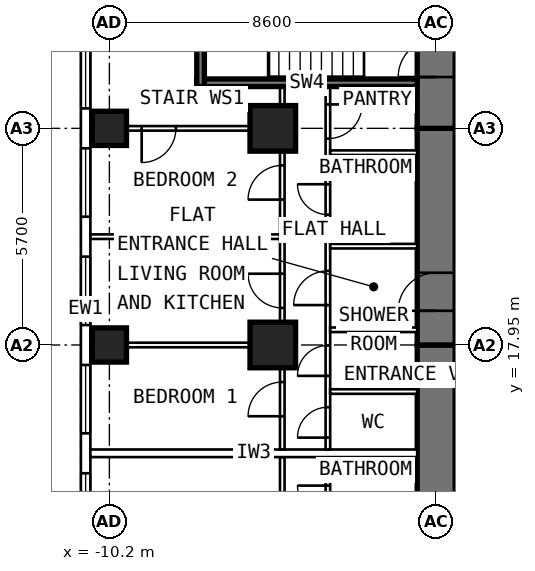
"""IFC4 building model, lengths in metres.
Left out: names, types, materials, properties, quantities, classifications, styles, units other than length and angle.
Written with IfcOpenShell. Run it as: python <this file> out.ifc"""

import sys

from ifc_helpers import new_model, si_unit, direction, frame, frame_2d, origin, origin_2d, place, context, subcontext, project, spatial, rectangle, extrude, element, fill, save


model = new_model("IFC4")
c1 = context("Model", 3, precision=1e-05, world=origin(), true_north=direction((0.0, 1.0)))
c2 = subcontext(c1, "Body", "Model", "MODEL_VIEW")
j1 = project(units=[si_unit("LENGTHUNIT", "METRE"), si_unit("PLANEANGLEUNIT", "RADIAN")], contexts=[c1])
p1 = place(None, origin())
s1 = spatial("IfcSite", under=j1, at=p1, CompositionType="ELEMENT")
p2 = place(p1, origin())
s2 = spatial("IfcBuilding", under=s1, at=p2, CompositionType="ELEMENT")
p3 = place(p2, frame((0.0, 0.0, 91.6)))
s3 = spatial("IfcBuildingStorey", under=s2, at=p3, CompositionType="ELEMENT", Elevation=91.6)
for number, where, z_axis, x_axis in (
    (1, (-10.2, 17.95, 0.0), (0.0, 0.0, 1.0), (0.0, 1.0, 0.0)),
    (2, (-10.2, 23.65, 0.0), (0.0, 0.0, 1.0), (0.0, 1.0, 0.0)),
):
    element("IfcColumn", number, at=place(p3, frame(where, z_axis=z_axis, x_axis=x_axis)), inside=s3, PredefinedType="COLUMN", context=c2, shape_type="SweptSolid", body=[
        extrude(rectangle(XDim=0.9, YDim=0.9, at=origin_2d()), origin(), (0.0, 0.0, 1.0), 3.6),
    ])
for number, where, z_axis, x_axis in (
    (3, (-5.9, 17.95, 0.0), (0.0, 0.0, 1.0), (0.0, 1.0, 0.0)),
    (4, (-5.9, 23.65, 0.0), (0.0, 0.0, 1.0), (0.0, 1.0, 0.0)),
):
    element("IfcColumn", number, at=place(p3, frame(where, z_axis=z_axis, x_axis=x_axis)), inside=s3, PredefinedType="COLUMN", context=c2, shape_type="SweptSolid", body=[
        extrude(rectangle(XDim=1.2, YDim=1.2, at=origin_2d()), origin(), (0.0, 0.0, 1.0), 3.6),
    ])
p4 = place(p3, frame((-1.6, 9.6, 0.0), z_axis=(0.0, 0.0, 1.0), x_axis=(0.0, 1.0, 0.0)))
e5 = element("IfcWall", 5, at=p4, inside=s3, PredefinedType="SHEAR", context=c2, shape_type="SweptSolid", body=[
    extrude(rectangle(XDim=8.35, YDim=1.0, at=frame_2d((4.175, 0.0))), origin(), (0.0, 0.0, 1.0), 3.6),
])
p5 = place(p4, frame((1.3, 0.0, 0.0)))
e6 = element("IfcOpeningElement", 6, at=p5, cuts=e5, PredefinedType="OPENING", context=c2, shape_type="SweptSolid", body=[
    extrude(rectangle(XDim=1.0, YDim=2.1, at=frame_2d((0.5, 1.05))), frame((0.0, 0.512, 0.0), z_axis=(0.0, -1.0, 0.0), x_axis=(1.0, 0.0, 0.0)), (0.0, 0.0, 1.0), 1.024),
])
p6 = place(p3, frame((-1.6, 17.95, 0.0), z_axis=(0.0, 0.0, 1.0), x_axis=(0.0, 1.0, 0.0)))
e7 = element("IfcWall", 7, at=p6, inside=s3, PredefinedType="SHEAR", context=c2, shape_type="SweptSolid", body=[
    extrude(rectangle(XDim=5.7, YDim=1.0, at=frame_2d((2.85, 0.0))), origin(), (0.0, 0.0, 1.0), 3.6),
])
p7 = place(p6, frame((0.9, 0.0, 0.0)))
e8 = element("IfcOpeningElement", 8, at=p7, cuts=e7, PredefinedType="OPENING", context=c2, shape_type="SweptSolid", body=[
    extrude(rectangle(XDim=1.0, YDim=2.1, at=frame_2d((0.5, 1.05))), frame((0.0, 0.512, 0.0), z_axis=(0.0, -1.0, 0.0), x_axis=(1.0, 0.0, 0.0)), (0.0, 0.0, 1.0), 1.024),
])
p8 = place(p3, frame((-1.6, 23.65, 0.0), z_axis=(0.0, 0.0, 1.0), x_axis=(0.0, 1.0, 0.0)))
e9 = element("IfcWall", 9, at=p8, inside=s3, PredefinedType="SHEAR", context=c2, shape_type="SweptSolid", body=[
    extrude(rectangle(XDim=10.745, YDim=1.0, at=frame_2d((5.373, 0.0))), origin(), (0.0, 0.0, 1.0), 3.6),
])
p9 = place(p8, frame((1.35, 0.0, 0.0)))
e10 = element("IfcOpeningElement", 10, at=p9, cuts=e9, PredefinedType="OPENING", context=c2, shape_type="SweptSolid", body=[
    extrude(rectangle(XDim=1.0, YDim=2.1, at=frame_2d((0.5, 1.05))), frame((0.0, 0.512, 0.0), z_axis=(0.0, -1.0, 0.0), x_axis=(1.0, 0.0, 0.0)), (0.0, 0.0, 1.0), 1.024),
])
p10 = place(p3, frame((-10.825, 6.148, 0.0), z_axis=(0.0, 0.0, 1.0), x_axis=(0.0, 1.0, 0.0)))
e11 = element("IfcWall", 11, at=p10, inside=s3, PredefinedType="SOLIDWALL", context=c2, shape_type="SweptSolid", body=[
    extrude(rectangle(XDim=25.487, YDim=0.25, at=frame_2d((12.744, 0.0))), origin(), (0.0, 0.0, 1.0), 3.35),
])
p11 = place(p10, frame((0.927, 0.0, 0.8)))
e12 = element("IfcOpeningElement", 12, at=p11, cuts=e11, PredefinedType="OPENING", context=c2, shape_type="SweptSolid", body=[
    extrude(rectangle(XDim=1.8, YDim=1.8, at=frame_2d((0.9, 0.9))), frame((0.0, 0.137, 0.0), z_axis=(0.0, -1.0, 0.0), x_axis=(1.0, 0.0, 0.0)), (0.0, 0.0, 1.0), 0.274),
])
p12 = place(p10, frame((3.777, 0.0, 0.8)))
e13 = element("IfcOpeningElement", 13, at=p12, cuts=e11, PredefinedType="OPENING", context=c2, shape_type="SweptSolid", body=[
    extrude(rectangle(XDim=1.8, YDim=1.8, at=frame_2d((0.9, 0.9))), frame((0.0, 0.137, 0.0), z_axis=(0.0, -1.0, 0.0), x_axis=(1.0, 0.0, 0.0)), (0.0, 0.0, 1.0), 0.274),
])
p13 = place(p10, frame((6.627, 0.0, 0.8)))
e14 = element("IfcOpeningElement", 14, at=p13, cuts=e11, PredefinedType="OPENING", context=c2, shape_type="SweptSolid", body=[
    extrude(rectangle(XDim=1.8, YDim=1.8, at=frame_2d((0.9, 0.9))), frame((0.0, 0.137, 0.0), z_axis=(0.0, -1.0, 0.0), x_axis=(1.0, 0.0, 0.0)), (0.0, 0.0, 1.0), 0.274),
])
p14 = place(p10, frame((9.477, 0.0, 0.8)))
e15 = element("IfcOpeningElement", 15, at=p14, cuts=e11, PredefinedType="OPENING", context=c2, shape_type="SweptSolid", body=[
    extrude(rectangle(XDim=1.8, YDim=1.8, at=frame_2d((0.9, 0.9))), frame((0.0, 0.137, 0.0), z_axis=(0.0, -1.0, 0.0), x_axis=(1.0, 0.0, 0.0)), (0.0, 0.0, 1.0), 0.274),
])
p15 = place(p10, frame((12.327, 0.0, 0.8)))
e16 = element("IfcOpeningElement", 16, at=p15, cuts=e11, PredefinedType="OPENING", context=c2, shape_type="SweptSolid", body=[
    extrude(rectangle(XDim=1.8, YDim=1.8, at=frame_2d((0.9, 0.9))), frame((0.0, 0.137, 0.0), z_axis=(0.0, -1.0, 0.0), x_axis=(1.0, 0.0, 0.0)), (0.0, 0.0, 1.0), 0.274),
])
p16 = place(p10, frame((15.177, 0.0, 0.8)))
e17 = element("IfcOpeningElement", 17, at=p16, cuts=e11, PredefinedType="OPENING", context=c2, shape_type="SweptSolid", body=[
    extrude(rectangle(XDim=1.8, YDim=1.8, at=frame_2d((0.9, 0.9))), frame((0.0, 0.137, 0.0), z_axis=(0.0, -1.0, 0.0), x_axis=(1.0, 0.0, 0.0)), (0.0, 0.0, 1.0), 0.274),
])
p17 = place(p10, frame((18.027, 0.0, 0.8)))
e18 = element("IfcOpeningElement", 18, at=p17, cuts=e11, PredefinedType="OPENING", context=c2, shape_type="SweptSolid", body=[
    extrude(rectangle(XDim=1.8, YDim=1.8, at=frame_2d((0.9, 0.9))), frame((0.0, 0.137, 0.0), z_axis=(0.0, -1.0, 0.0), x_axis=(1.0, 0.0, 0.0)), (0.0, 0.0, 1.0), 0.274),
])
p18 = place(p10, frame((20.877, 0.0, 0.8)))
e19 = element("IfcOpeningElement", 19, at=p18, cuts=e11, PredefinedType="OPENING", context=c2, shape_type="SweptSolid", body=[
    extrude(rectangle(XDim=1.8, YDim=1.8, at=frame_2d((0.9, 0.9))), frame((0.0, 0.137, 0.0), z_axis=(0.0, -1.0, 0.0), x_axis=(1.0, 0.0, 0.0)), (0.0, 0.0, 1.0), 0.274),
])
p19 = place(p3, frame((-4.45, 10.1, 0.0), z_axis=(0.0, 0.0, 1.0), x_axis=(0.0, 1.0, 0.0)))
e20 = element("IfcWall", 20, at=p19, inside=s3, PredefinedType="PARTITIONING", context=c2, shape_type="SweptSolid", body=[
    extrude(rectangle(XDim=4.9, YDim=0.12, at=frame_2d((2.45, 0.0))), origin(), (0.0, 0.0, 1.0), 3.35),
])
p20 = place(p19, frame((0.75, 0.0, 0.0)))
e21 = element("IfcOpeningElement", 21, at=p20, cuts=e20, PredefinedType="OPENING", context=c2, shape_type="SweptSolid", body=[
    extrude(rectangle(XDim=0.9, YDim=2.1, at=frame_2d((0.45, 1.05))), frame((0.0, 0.072, 0.0), z_axis=(0.0, -1.0, 0.0), x_axis=(1.0, 0.0, 0.0)), (0.0, 0.0, 1.0), 0.144),
])
p21 = place(p19, frame((3.35, 0.0, 0.0)))
e22 = element("IfcOpeningElement", 22, at=p21, cuts=e20, PredefinedType="OPENING", context=c2, shape_type="SweptSolid", body=[
    extrude(rectangle(XDim=0.8, YDim=2.1, at=frame_2d((0.4, 1.05))), frame((0.0, 0.072, 0.0), z_axis=(0.0, -1.0, 0.0), x_axis=(1.0, 0.0, 0.0)), (0.0, 0.0, 1.0), 0.144),
])
p22 = place(p3, frame((-5.65, 9.6, 0.0), z_axis=(0.0, 0.0, 1.0), x_axis=(0.0, 1.0, 0.0)))
e23 = element("IfcWall", 23, at=p22, inside=s3, PredefinedType="PARTITIONING", context=c2, shape_type="SweptSolid", body=[
    extrude(rectangle(XDim=5.4, YDim=0.12, at=frame_2d((2.7, 0.0))), origin(), (0.0, 0.0, 1.0), 3.35),
])
p23 = place(p22, frame((3.4, 0.0, 0.0)))
e24 = element("IfcOpeningElement", 24, at=p23, cuts=e23, PredefinedType="OPENING", context=c2, shape_type="SweptSolid", body=[
    extrude(rectangle(XDim=0.9, YDim=2.1, at=frame_2d((0.45, 1.05))), frame((0.0, 0.072, 0.0), z_axis=(0.0, -1.0, 0.0), x_axis=(1.0, 0.0, 0.0)), (0.0, 0.0, 1.0), 0.144),
])
p24 = place(p3, frame((-4.45, 15.2, 0.0), z_axis=(0.0, 0.0, 1.0), x_axis=(0.0, 1.0, 0.0)))
e25 = element("IfcWall", 25, at=p24, inside=s3, PredefinedType="PARTITIONING", context=c2, shape_type="SweptSolid", body=[
    extrude(rectangle(XDim=9.55, YDim=0.12, at=frame_2d((4.775, 0.0))), origin(), (0.0, 0.0, 1.0), 3.35),
])
p25 = place(p24, frame((0.312, 0.0, 0.0)))
e26 = element("IfcOpeningElement", 26, at=p25, cuts=e25, PredefinedType="OPENING", context=c2, shape_type="SweptSolid", body=[
    extrude(rectangle(XDim=0.8, YDim=2.1, at=frame_2d((0.4, 1.05))), frame((0.0, 0.072, 0.0), z_axis=(0.0, -1.0, 0.0), x_axis=(1.0, 0.0, 0.0)), (0.0, 0.0, 1.0), 0.144),
])
p26 = place(p24, frame((1.938, 0.0, 0.0)))
e27 = element("IfcOpeningElement", 27, at=p26, cuts=e25, PredefinedType="OPENING", context=c2, shape_type="SweptSolid", body=[
    extrude(rectangle(XDim=0.8, YDim=2.1, at=frame_2d((0.4, 1.05))), frame((0.0, 0.072, 0.0), z_axis=(0.0, -1.0, 0.0), x_axis=(1.0, 0.0, 0.0)), (0.0, 0.0, 1.0), 0.144),
])
p27 = place(p24, frame((3.8, 0.0, 0.0)))
e28 = element("IfcOpeningElement", 28, at=p27, cuts=e25, PredefinedType="OPENING", context=c2, shape_type="SweptSolid", body=[
    extrude(rectangle(XDim=0.9, YDim=2.1, at=frame_2d((0.45, 1.05))), frame((0.0, 0.072, 0.0), z_axis=(0.0, -1.0, 0.0), x_axis=(1.0, 0.0, 0.0)), (0.0, 0.0, 1.0), 0.144),
])
p28 = place(p24, frame((6.18, 0.0, 0.0)))
e29 = element("IfcOpeningElement", 29, at=p28, cuts=e25, PredefinedType="OPENING", context=c2, shape_type="SweptSolid", body=[
    extrude(rectangle(XDim=0.8, YDim=2.1, at=frame_2d((0.4, 1.05))), frame((0.0, 0.072, 0.0), z_axis=(0.0, -1.0, 0.0), x_axis=(1.0, 0.0, 0.0)), (0.0, 0.0, 1.0), 0.144),
])
p29 = place(p24, frame((8.18, 0.0, 0.0)))
e30 = element("IfcOpeningElement", 30, at=p29, cuts=e25, PredefinedType="OPENING", context=c2, shape_type="SweptSolid", body=[
    extrude(rectangle(XDim=0.9, YDim=2.1, at=frame_2d((0.45, 1.05))), frame((0.0, 0.072, 0.0), z_axis=(0.0, -1.0, 0.0), x_axis=(1.0, 0.0, 0.0)), (0.0, 0.0, 1.0), 0.144),
])
p30 = place(p3, frame((-5.65, 15.2, 0.0), z_axis=(0.0, 0.0, 1.0), x_axis=(0.0, 1.0, 0.0)))
e31 = element("IfcWall", 31, at=p30, inside=s3, PredefinedType="PARTITIONING", context=c2, shape_type="SweptSolid", body=[
    extrude(rectangle(XDim=9.55, YDim=0.12, at=frame_2d((4.775, 0.0))), origin(), (0.0, 0.0, 1.0), 3.35),
])
p31 = place(p30, frame((0.875, 0.0, 0.0)))
e32 = element("IfcOpeningElement", 32, at=p31, cuts=e31, PredefinedType="OPENING", context=c2, shape_type="SweptSolid", body=[
    extrude(rectangle(XDim=0.9, YDim=2.1, at=frame_2d((0.45, 1.05))), frame((0.0, 0.072, 0.0), z_axis=(0.0, -1.0, 0.0), x_axis=(1.0, 0.0, 0.0)), (0.0, 0.0, 1.0), 0.144),
])
p32 = place(p30, frame((3.725, 0.0, 0.0)))
e33 = element("IfcOpeningElement", 33, at=p32, cuts=e31, PredefinedType="OPENING", context=c2, shape_type="SweptSolid", body=[
    extrude(rectangle(XDim=0.9, YDim=2.1, at=frame_2d((0.45, 1.05))), frame((0.0, 0.072, 0.0), z_axis=(0.0, -1.0, 0.0), x_axis=(1.0, 0.0, 0.0)), (0.0, 0.0, 1.0), 0.144),
])
p33 = place(p30, frame((6.575, 0.0, 0.0)))
e34 = element("IfcOpeningElement", 34, at=p33, cuts=e31, PredefinedType="OPENING", context=c2, shape_type="SweptSolid", body=[
    extrude(rectangle(XDim=0.9, YDim=2.1, at=frame_2d((0.45, 1.05))), frame((0.0, 0.072, 0.0), z_axis=(0.0, -1.0, 0.0), x_axis=(1.0, 0.0, 0.0)), (0.0, 0.0, 1.0), 0.144),
])
p34 = place(p3, frame((-5.71, 17.95, 0.0), z_axis=(0.0, 0.0, 1.0), x_axis=(-1.0, 0.0, 0.0)))
e35 = element("IfcWall", 35, at=p34, inside=s3, PredefinedType="PARTITIONING", context=c2, shape_type="SweptSolid", body=[
    extrude(rectangle(XDim=4.99, YDim=0.12, at=frame_2d((2.495, 0.0))), origin(), (0.0, 0.0, 1.0), 2.45),
])
p35 = place(p3, frame((-5.71, 20.8, 0.0), z_axis=(0.0, 0.0, 1.0), x_axis=(-1.0, 0.0, 0.0)))
e36 = element("IfcWall", 36, at=p35, inside=s3, PredefinedType="PARTITIONING", context=c2, shape_type="SweptSolid", body=[
    extrude(rectangle(XDim=4.99, YDim=0.12, at=frame_2d((2.495, 0.0))), origin(), (0.0, 0.0, 1.0), 3.35),
])
for number, where, z_axis, x_axis in (
    (37, (-2.1, 16.725, 0.0), (0.0, 0.0, 1.0), (-1.0, 0.0, 0.0)),
    (38, (-2.1, 18.35, 0.0), (0.0, 0.0, 1.0), (-1.0, 0.0, 0.0)),
    (39, (-2.1, 20.55, 0.0), (0.0, 0.0, 1.0), (-1.0, 0.0, 0.0)),
    (40, (-2.1, 23.01, 0.0), (0.0, 0.0, 1.0), (-1.0, 0.0, 0.0)),
):
    element("IfcWall", number, at=place(p3, frame(where, z_axis=z_axis, x_axis=x_axis)), inside=s3, PredefinedType="PARTITIONING", context=c2, shape_type="SweptSolid", body=[
        extrude(rectangle(XDim=2.29, YDim=0.12, at=frame_2d((1.145, 0.0))), origin(), (0.0, 0.0, 1.0), 3.35),
    ])
p36 = place(p3, frame((-2.1, 15.1, 0.0), z_axis=(0.0, 0.0, 1.0), x_axis=(-1.0, 0.0, 0.0)))
e41 = element("IfcWall", 41, at=p36, inside=s3, PredefinedType="PARTITIONING", context=c2, shape_type="SweptSolid", body=[
    extrude(rectangle(XDim=8.6, YDim=0.2, at=frame_2d((4.3, 0.0))), origin(), (0.0, 0.0, 1.0), 3.35),
])
p37 = place(p3, frame((-5.71, 23.65, 0.0), z_axis=(0.0, 0.0, 1.0), x_axis=(-1.0, 0.0, 0.0)))
e42 = element("IfcWall", 42, at=p37, inside=s3, PredefinedType="PARTITIONING", context=c2, shape_type="SweptSolid", body=[
    extrude(rectangle(XDim=4.99, YDim=0.12, at=frame_2d((2.495, 0.0))), origin(), (0.0, 0.0, 1.0), 2.45),
])
p38 = place(p37, frame((2.74, 0.0, 0.0)))
e43 = element("IfcOpeningElement", 43, at=p38, cuts=e42, PredefinedType="OPENING", context=c2, shape_type="SweptSolid", body=[
    extrude(rectangle(XDim=0.9, YDim=2.1, at=frame_2d((0.45, 1.05))), frame((0.0, 0.072, 0.0), z_axis=(0.0, -1.0, 0.0), x_axis=(1.0, 0.0, 0.0)), (0.0, 0.0, 1.0), 0.144),
])
p39 = place(p3, frame((-2.1, 24.85, 0.0), z_axis=(0.0, 0.0, 1.0), x_axis=(-1.0, 0.0, 0.0)))
e44 = element("IfcWall", 44, at=p39, inside=s3, PredefinedType="SHEAR", context=c2, shape_type="SweptSolid", body=[
    extrude(rectangle(XDim=5.8, YDim=0.2, at=frame_2d((2.9, 0.0))), origin(), (0.0, 0.0, 1.0), 3.33),
])
p40 = place(p3, frame((-7.8, 24.75, 0.0), z_axis=(0.0, 0.0, 1.0), x_axis=(0.0, 1.0, 0.0)))
e45 = element("IfcWall", 45, at=p40, inside=s3, PredefinedType="SHEAR", context=c2, shape_type="SweptSolid", body=[
    extrude(rectangle(XDim=4.0, YDim=0.2, at=frame_2d((2.0, 0.0))), origin(), (0.0, 0.0, 1.0), 3.33),
])
p41 = place(p13, origin())
e46 = element("IfcWindow", 46, at=p41, inside=s3, PartitioningType="SINGLE_PANEL", PredefinedType="WINDOW", context=c2, shape_type="SweptSolid", body=[
    extrude(rectangle(XDim=1.8, YDim=1.8, at=frame_2d((0.9, 0.9))), frame((0.0, 0.03, 0.0), z_axis=(0.0, -1.0, 0.0), x_axis=(1.0, 0.0, 0.0)), (0.0, 0.0, 1.0), 0.06),
])
fill(e14, e46)
p42 = place(p14, origin())
e47 = element("IfcWindow", 47, at=p42, inside=s3, PartitioningType="SINGLE_PANEL", PredefinedType="WINDOW", context=c2, shape_type="SweptSolid", body=[
    extrude(rectangle(XDim=1.8, YDim=1.8, at=frame_2d((0.9, 0.9))), frame((0.0, 0.03, 0.0), z_axis=(0.0, -1.0, 0.0), x_axis=(1.0, 0.0, 0.0)), (0.0, 0.0, 1.0), 0.06),
])
fill(e15, e47)
p43 = place(p15, origin())
e48 = element("IfcWindow", 48, at=p43, inside=s3, PartitioningType="SINGLE_PANEL", PredefinedType="WINDOW", context=c2, shape_type="SweptSolid", body=[
    extrude(rectangle(XDim=1.8, YDim=1.8, at=frame_2d((0.9, 0.9))), frame((0.0, 0.03, 0.0), z_axis=(0.0, -1.0, 0.0), x_axis=(1.0, 0.0, 0.0)), (0.0, 0.0, 1.0), 0.06),
])
fill(e16, e48)
p44 = place(p16, origin())
e49 = element("IfcWindow", 49, at=p44, inside=s3, PartitioningType="SINGLE_PANEL", PredefinedType="WINDOW", context=c2, shape_type="SweptSolid", body=[
    extrude(rectangle(XDim=1.8, YDim=1.8, at=frame_2d((0.9, 0.9))), frame((0.0, 0.03, 0.0), z_axis=(0.0, -1.0, 0.0), x_axis=(1.0, 0.0, 0.0)), (0.0, 0.0, 1.0), 0.06),
])
fill(e17, e49)
p45 = place(p17, origin())
e50 = element("IfcWindow", 50, at=p45, inside=s3, PartitioningType="SINGLE_PANEL", PredefinedType="WINDOW", context=c2, shape_type="SweptSolid", body=[
    extrude(rectangle(XDim=1.8, YDim=1.8, at=frame_2d((0.9, 0.9))), frame((0.0, 0.03, 0.0), z_axis=(0.0, -1.0, 0.0), x_axis=(1.0, 0.0, 0.0)), (0.0, 0.0, 1.0), 0.06),
])
fill(e18, e50)
p46 = place(p21, origin())
e51 = element("IfcDoor", 51, at=p46, inside=s3, OperationType="SINGLE_SWING_RIGHT", PredefinedType="DOOR", context=c2, shape_type="SweptSolid", body=[
    extrude(rectangle(XDim=0.8, YDim=2.1, at=frame_2d((0.4, 1.05))), frame((0.0, 0.025, 0.0), z_axis=(0.0, -1.0, 0.0), x_axis=(1.0, 0.0, 0.0)), (0.0, 0.0, 1.0), 0.05),
])
fill(e22, e51)
p47 = place(p7, origin())
e52 = element("IfcDoor", 52, at=p47, inside=s3, OperationType="SINGLE_SWING_LEFT", PredefinedType="DOOR", context=c2, shape_type="SweptSolid", body=[
    extrude(rectangle(XDim=1.0, YDim=2.1, at=frame_2d((0.5, 1.05))), frame((0.0, 0.25, 0.0), z_axis=(0.0, -1.0, 0.0), x_axis=(1.0, 0.0, 0.0)), (0.0, 0.0, 1.0), 0.5),
])
fill(e8, e52)
p48 = place(p31, origin())
e53 = element("IfcDoor", 53, at=p48, inside=s3, OperationType="SINGLE_SWING_LEFT", PredefinedType="DOOR", context=c2, shape_type="SweptSolid", body=[
    extrude(rectangle(XDim=0.9, YDim=2.1, at=frame_2d((0.45, 1.05))), frame((0.0, 0.025, 0.0), z_axis=(0.0, -1.0, 0.0), x_axis=(1.0, 0.0, 0.0)), (0.0, 0.0, 1.0), 0.05),
])
fill(e32, e53)
p49 = place(p32, origin())
e54 = element("IfcDoor", 54, at=p49, inside=s3, OperationType="SINGLE_SWING_RIGHT", PredefinedType="DOOR", context=c2, shape_type="SweptSolid", body=[
    extrude(rectangle(XDim=0.9, YDim=2.1, at=frame_2d((0.45, 1.05))), frame((0.0, 0.025, 0.0), z_axis=(0.0, -1.0, 0.0), x_axis=(1.0, 0.0, 0.0)), (0.0, 0.0, 1.0), 0.05),
])
fill(e33, e54)
p50 = place(p33, origin())
e55 = element("IfcDoor", 55, at=p50, inside=s3, OperationType="SINGLE_SWING_LEFT", PredefinedType="DOOR", context=c2, shape_type="SweptSolid", body=[
    extrude(rectangle(XDim=0.9, YDim=2.1, at=frame_2d((0.45, 1.05))), frame((0.0, 0.025, 0.0), z_axis=(0.0, -1.0, 0.0), x_axis=(1.0, 0.0, 0.0)), (0.0, 0.0, 1.0), 0.05),
])
fill(e34, e55)
p51 = place(p25, origin())
e56 = element("IfcDoor", 56, at=p51, inside=s3, OperationType="SINGLE_SWING_LEFT", PredefinedType="DOOR", context=c2, shape_type="SweptSolid", body=[
    extrude(rectangle(XDim=0.8, YDim=2.1, at=frame_2d((0.4, 1.05))), frame((0.0, 0.025, 0.0), z_axis=(0.0, -1.0, 0.0), x_axis=(1.0, 0.0, 0.0)), (0.0, 0.0, 1.0), 0.05),
])
fill(e26, e56)
p52 = place(p26, origin())
e57 = element("IfcDoor", 57, at=p52, inside=s3, OperationType="SINGLE_SWING_LEFT", PredefinedType="DOOR", context=c2, shape_type="SweptSolid", body=[
    extrude(rectangle(XDim=0.8, YDim=2.1, at=frame_2d((0.4, 1.05))), frame((0.0, 0.025, 0.0), z_axis=(0.0, -1.0, 0.0), x_axis=(1.0, 0.0, 0.0)), (0.0, 0.0, 1.0), 0.05),
])
fill(e27, e57)
p53 = place(p27, origin())
e58 = element("IfcDoor", 58, at=p53, inside=s3, OperationType="SINGLE_SWING_LEFT", PredefinedType="DOOR", context=c2, shape_type="SweptSolid", body=[
    extrude(rectangle(XDim=0.9, YDim=2.1, at=frame_2d((0.45, 1.05))), frame((0.0, 0.025, 0.0), z_axis=(0.0, -1.0, 0.0), x_axis=(1.0, 0.0, 0.0)), (0.0, 0.0, 1.0), 0.05),
])
fill(e28, e58)
p54 = place(p28, origin())
e59 = element("IfcDoor", 59, at=p54, inside=s3, OperationType="SINGLE_SWING_RIGHT", PredefinedType="DOOR", context=c2, shape_type="SweptSolid", body=[
    extrude(rectangle(XDim=0.8, YDim=2.1, at=frame_2d((0.4, 1.05))), frame((0.0, 0.025, 0.0), z_axis=(0.0, -1.0, 0.0), x_axis=(1.0, 0.0, 0.0)), (0.0, 0.0, 1.0), 0.05),
])
fill(e29, e59)
p55 = place(p29, frame((0.9, 0.0, 0.0), z_axis=(0.0, 0.0, 1.0), x_axis=(-1.0, 0.0, 0.0)))
e60 = element("IfcDoor", 60, at=p55, inside=s3, OperationType="SINGLE_SWING_LEFT", PredefinedType="DOOR", context=c2, shape_type="SweptSolid", body=[
    extrude(rectangle(XDim=0.9, YDim=2.1, at=frame_2d((0.45, 1.05))), frame((0.0, 0.025, 0.0), z_axis=(0.0, -1.0, 0.0), x_axis=(1.0, 0.0, 0.0)), (0.0, 0.0, 1.0), 0.05),
])
fill(e30, e60)
p56 = place(p38, origin())
e61 = element("IfcDoor", 61, at=p56, inside=s3, OperationType="SINGLE_SWING_RIGHT", PredefinedType="DOOR", context=c2, shape_type="SweptSolid", body=[
    extrude(rectangle(XDim=0.9, YDim=2.1, at=frame_2d((0.45, 1.05))), frame((0.0, 0.025, 0.0), z_axis=(0.0, -1.0, 0.0), x_axis=(1.0, 0.0, 0.0)), (0.0, 0.0, 1.0), 0.05),
])
fill(e43, e61)
p57 = place(p9, origin())
e62 = element("IfcDoor", 62, at=p57, inside=s3, OperationType="SINGLE_SWING_LEFT", PredefinedType="DOOR", context=c2, shape_type="SweptSolid", body=[
    extrude(rectangle(XDim=1.0, YDim=2.1, at=frame_2d((0.5, 1.05))), frame((0.0, 0.25, 0.0), z_axis=(0.0, -1.0, 0.0), x_axis=(1.0, 0.0, 0.0)), (0.0, 0.0, 1.0), 0.5),
])
fill(e10, e62)
save(model, sys.argv[1])
